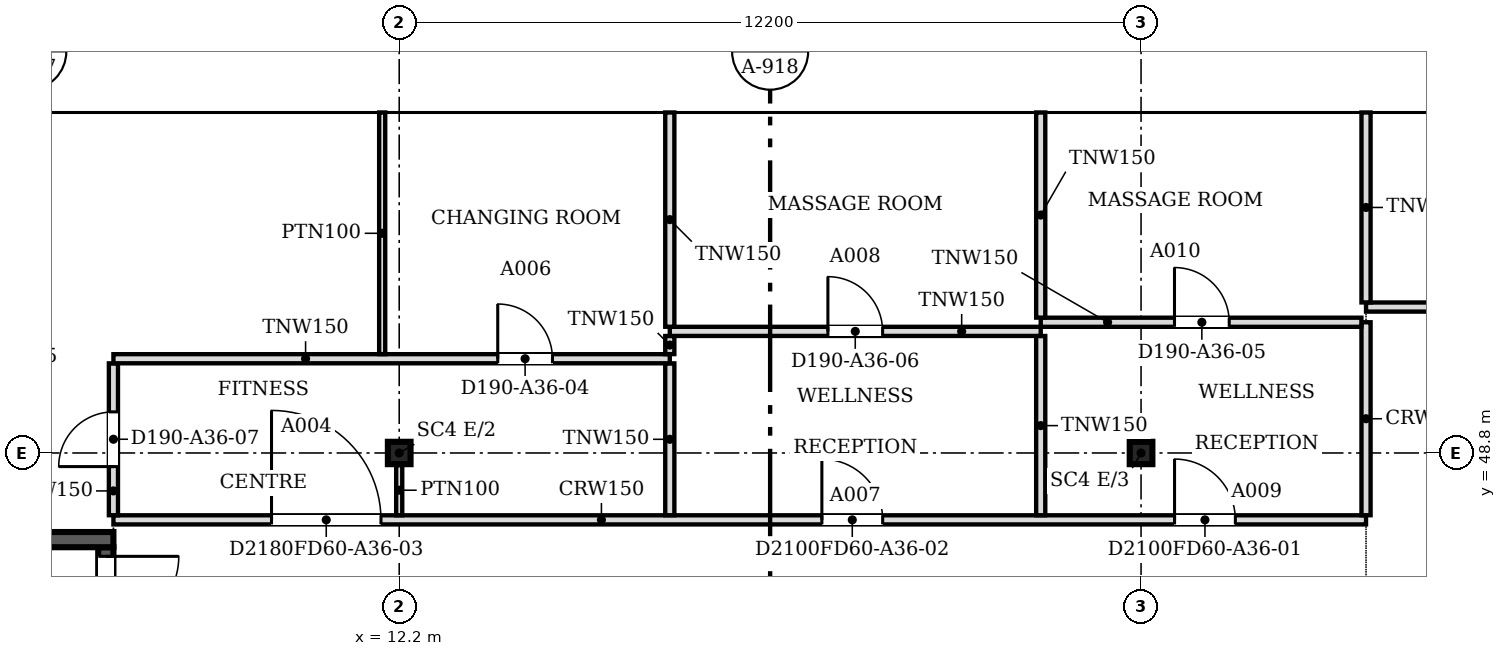
"""IFC4 building model, lengths in metres.
Left out: names, types, materials, properties, quantities, classifications, styles, units other than length and angle.
Written with IfcOpenShell. Run it as: python <this file> out.ifc"""

import sys

from ifc_helpers import new_model, si_unit, direction, frame, frame_2d, origin, origin_2d, place, context, subcontext, project, spatial, polyline, rectangle, i_section, outline, extrude, faceted_brep, source, transform, mapped, element, fill, save


model = new_model("IFC4")
c1 = context("Model", 3, precision=1e-05, world=origin(), true_north=direction((0.0, 1.0)))
c2 = subcontext(c1, "Body", "Model", "MODEL_VIEW")
j1 = project(units=[si_unit("LENGTHUNIT", "METRE"), si_unit("PLANEANGLEUNIT", "RADIAN")], contexts=[c1])
p1 = place(None, origin())
s1 = spatial("IfcSite", under=j1, at=p1, CompositionType="ELEMENT")
p2 = place(p1, origin())
s2 = spatial("IfcBuilding", under=s1, at=p2, CompositionType="ELEMENT")
p3 = place(p2, frame((0.0, 0.0, 236.9)))
s3 = spatial("IfcBuildingStorey", under=s2, at=p3, CompositionType="ELEMENT", Elevation=236.9)
for number, where, z_axis, x_axis in (
    (1, (12.2, 48.8, 0.0), (0.0, 0.0, 1.0), (1.0, 0.0, 0.0)),
    (2, (24.4, 48.8, 0.0), (0.0, 0.0, 1.0), (1.0, 0.0, 0.0)),
):
    element("IfcColumn", number, at=place(p3, frame(where, z_axis=z_axis, x_axis=x_axis)), inside=s3, PredefinedType="COLUMN", context=c2, shape_type="SweptSolid", body=[
        extrude(i_section(OverallWidth=0.373, OverallDepth=0.368, WebThickness=0.015, FlangeThickness=0.024, at=origin_2d()), origin(), (0.0, 0.0, 1.0), 3.6),
    ])
m1 = source(origin(), c2, "Body", "SweptSolid", [
    extrude(outline(polyline([(6.1, 0.0), (3.05, 3.8), (0.0, 0.0), (6.1, 0.0)])), frame((0.0, 0.25, 0.0), z_axis=(0.0, -1.0, 0.0), x_axis=(1.0, 0.0, 0.0)), (0.0, 0.0, 1.0), 0.5),
])
p4 = place(p3, frame((33.55, 54.65, 0.0), z_axis=(0.0, 0.0, 1.0), x_axis=(-1.0, 0.0, 0.0)))
e3 = element("IfcWall", 3, at=p4, inside=s3, PredefinedType="SOLIDWALL", context=c2, shape_type="MappedRepresentation", body=[
    mapped(m1, transform((0.0, 0.0, 0.0), scale=1.0)),
])
m2 = source(origin(), c2, "Body", "SweptSolid", [
    extrude(outline(polyline([(5.579, 0.25), (3.05, 3.401), (0.521, 0.25), (5.579, 0.25)])), frame((0.0, 0.26, 0.0), z_axis=(0.0, -1.0, 0.0), x_axis=(1.0, 0.0, 0.0)), (0.0, 0.0, 1.0), 0.52),
])
p5 = place(p4, origin())
e4 = element("IfcOpeningElement", 4, at=p5, cuts=e3, PredefinedType="OPENING", context=c2, shape_type="MappedRepresentation", body=[
    mapped(m2, transform((0.0, 0.0, 0.0), scale=1.0)),
])
m3 = source(origin(), c2, "Body", "Brep", [
    faceted_brep([(6.1, -0.25, 0.0), (3.05, -0.25, 3.8), (0.0, -0.25, 0.0), (6.1, -0.25, 0.0), (0.0, 0.25, 0.0), (3.05, 0.25, 3.8), (6.1, 0.25, 0.0), (6.1, 0.25, 0.0)], [[[0, 1, 2, 3]], [[4, 5, 6, 7]], [[6, 5, 1, 0]], [[5, 4, 2, 1]], [[4, 7, 3, 2]], [[3, 7, 6, 0]]]),
])
p6 = place(p3, frame((27.45, 54.65, 0.0), z_axis=(0.0, 0.0, 1.0), x_axis=(-1.0, 0.0, 0.0)))
e5 = element("IfcWall", 5, at=p6, inside=s3, PredefinedType="SOLIDWALL", context=c2, shape_type="MappedRepresentation", body=[
    mapped(m3, transform((0.0, 0.0, 0.0), scale=1.0)),
])
p7 = place(p6, origin())
e6 = element("IfcOpeningElement", 6, at=p7, cuts=e5, PredefinedType="OPENING", context=c2, shape_type="MappedRepresentation", body=[
    mapped(m2, transform((0.0, 0.0, 0.0), scale=1.0)),
])
p8 = place(p3, frame((21.35, 54.65, 0.0), z_axis=(0.0, 0.0, 1.0), x_axis=(-1.0, 0.0, 0.0)))
e7 = element("IfcWall", 7, at=p8, inside=s3, PredefinedType="SOLIDWALL", context=c2, shape_type="MappedRepresentation", body=[
    mapped(m1, transform((0.0, 0.0, 0.0), scale=1.0)),
])
p9 = place(p8, origin())
e8 = element("IfcOpeningElement", 8, at=p9, cuts=e7, PredefinedType="OPENING", context=c2, shape_type="MappedRepresentation", body=[
    mapped(m2, transform((0.0, 0.0, 0.0), scale=1.0)),
])
p10 = place(p3, frame((15.25, 54.65, 0.0), z_axis=(0.0, 0.0, 1.0), x_axis=(-1.0, 0.0, 0.0)))
e9 = element("IfcWall", 9, at=p10, inside=s3, PredefinedType="SOLIDWALL", context=c2, shape_type="MappedRepresentation", body=[
    mapped(m1, transform((0.0, 0.0, 0.0), scale=1.0)),
])
p11 = place(p10, origin())
e10 = element("IfcOpeningElement", 10, at=p11, cuts=e9, PredefinedType="OPENING", context=c2, shape_type="MappedRepresentation", body=[
    mapped(m2, transform((0.0, 0.0, 0.0), scale=1.0)),
])
m4 = source(origin(), c2, "Body", "Brep", [
    faceted_brep([(3.05, -0.25, 3.74), (3.003, -0.25, 3.8), (0.0, -0.25, 0.0), (3.05, -0.25, 0.0), (0.0, 0.25, 0.0), (2.957, 0.25, 3.741), (2.957, 0.25, 0.0), (3.003, 0.0, 3.8)], [[[0, 1, 2, 3]], [[4, 5, 6]], [[7, 1, 0]], [[5, 4, 2, 1, 7]], [[4, 6, 3, 2]], [[3, 6, 5, 7, 0]]]),
])
p12 = place(p3, frame((9.15, 54.65, 0.0), z_axis=(0.0, 0.0, 1.0), x_axis=(-1.0, 0.0, 0.0)))
e11 = element("IfcWall", 11, at=p12, inside=s3, PredefinedType="SOLIDWALL", context=c2, shape_type="MappedRepresentation", body=[
    mapped(m4, transform((0.0, 0.0, 0.0), scale=1.0)),
])
m5 = source(origin(), c2, "Body", "SweptSolid", [
    extrude(outline(polyline([(2.803, 3.144), (0.516, 0.25), (2.803, 0.25), (2.803, 3.144)])), frame((0.0, 0.26, 0.0), z_axis=(0.0, -1.0, 0.0), x_axis=(1.0, 0.0, 0.0)), (0.0, 0.0, 1.0), 0.52),
])
p13 = place(p12, origin())
e12 = element("IfcOpeningElement", 12, at=p13, cuts=e11, PredefinedType="OPENING", context=c2, shape_type="MappedRepresentation", body=[
    mapped(m5, transform((0.0, 0.0, 0.0), scale=1.0)),
])
p14 = place(p2, frame((0.0, 0.0, 240.7)))
s4 = spatial("IfcBuildingStorey", under=s2, at=p14, CompositionType="ELEMENT", Elevation=240.7)
m6 = source(origin(), c2, "Body", "SweptSolid", [
    extrude(outline(polyline([(3.05, 0.0), (6.1, 3.8), (3.05, 7.6), (0.0, 3.8), (3.05, 0.0)])), frame((0.0, 0.25, 0.0), z_axis=(0.0, -1.0, 0.0), x_axis=(1.0, 0.0, 0.0)), (0.0, 0.0, 1.0), 0.5),
])
p15 = place(p14, frame((30.5, 54.65, -3.8), z_axis=(0.0, 0.0, 1.0), x_axis=(-1.0, 0.0, 0.0)))
e13 = element("IfcWall", 13, at=p15, inside=s4, PredefinedType="SOLIDWALL", context=c2, shape_type="MappedRepresentation", body=[
    mapped(m6, transform((0.0, 0.0, 0.0), scale=1.0)),
])
m7 = source(origin(), c2, "Body", "SweptSolid", [
    extrude(outline(polyline([(3.05, 0.399), (5.78, 3.8), (3.05, 7.201), (0.321, 3.8), (3.05, 0.399)])), frame((0.0, 0.26, 0.0), z_axis=(0.0, -1.0, 0.0), x_axis=(1.0, 0.0, 0.0)), (0.0, 0.0, 1.0), 0.52),
])
p16 = place(p15, origin())
e14 = element("IfcOpeningElement", 14, at=p16, cuts=e13, PredefinedType="OPENING", context=c2, shape_type="MappedRepresentation", body=[
    mapped(m7, transform((0.0, 0.0, 0.0), scale=1.0)),
])
m8 = source(origin(), c2, "Body", "Brep", [
    faceted_brep([(3.05, -0.25, 0.0), (6.1, -0.25, 3.8), (6.1, -0.25, 3.8), (3.05, -0.25, 7.6), (0.0, -0.25, 3.8), (0.0, 0.25, 3.8), (3.05, 0.25, 7.6), (6.1, 0.25, 3.8), (6.1, 0.25, 3.8), (3.05, 0.25, 0.0)], [[[0, 1, 2, 3, 4]], [[5, 6, 7, 8, 9]], [[9, 8, 1, 0]], [[7, 6, 3, 2]], [[6, 5, 4, 3]], [[5, 9, 0, 4]], [[1, 8, 7, 2]]]),
])
p17 = place(p14, frame((24.4, 54.65, -3.8), z_axis=(0.0, 0.0, 1.0), x_axis=(-1.0, 0.0, 0.0)))
e15 = element("IfcWall", 15, at=p17, inside=s4, PredefinedType="SOLIDWALL", context=c2, shape_type="MappedRepresentation", body=[
    mapped(m8, transform((0.0, 0.0, 0.0), scale=1.0)),
])
p18 = place(p17, origin())
e16 = element("IfcOpeningElement", 16, at=p18, cuts=e15, PredefinedType="OPENING", context=c2, shape_type="MappedRepresentation", body=[
    mapped(m7, transform((0.0, 0.0, 0.0), scale=1.0)),
])
p19 = place(p14, frame((18.3, 54.65, -3.8), z_axis=(0.0, 0.0, 1.0), x_axis=(-1.0, 0.0, 0.0)))
e17 = element("IfcWall", 17, at=p19, inside=s4, PredefinedType="SOLIDWALL", context=c2, shape_type="MappedRepresentation", body=[
    mapped(m6, transform((0.0, 0.0, 0.0), scale=1.0)),
])
p20 = place(p19, origin())
e18 = element("IfcOpeningElement", 18, at=p20, cuts=e17, PredefinedType="OPENING", context=c2, shape_type="MappedRepresentation", body=[
    mapped(m7, transform((0.0, 0.0, 0.0), scale=1.0)),
])
m9 = source(origin(), c2, "Body", "Brep", [
    faceted_brep([(3.05, -0.25, 0.0), (6.053, -0.25, 3.8), (3.05, -0.25, 7.6), (0.0, -0.25, 3.8), (0.0, 0.25, 3.8), (3.05, 0.25, 7.6), (6.007, 0.25, 3.859), (6.007, 0.25, 3.741), (3.05, 0.25, 0.0), (6.053, 0.0, 3.8)], [[[0, 1, 2, 3]], [[4, 5, 6, 7, 8]], [[8, 7, 9, 1, 0]], [[6, 5, 2, 1, 9]], [[5, 4, 3, 2]], [[4, 8, 0, 3]], [[9, 7, 6]]]),
])
p21 = place(p14, frame((12.2, 54.65, -3.8), z_axis=(0.0, 0.0, 1.0), x_axis=(-1.0, 0.0, 0.0)))
e19 = element("IfcWall", 19, at=p21, inside=s4, PredefinedType="SOLIDWALL", context=c2, shape_type="MappedRepresentation", body=[
    mapped(m9, transform((0.0, 0.0, 0.0), scale=1.0)),
])
m10 = source(origin(), c2, "Body", "SweptSolid", [
    extrude(outline(polyline([(3.049, 0.401), (5.735, 3.8), (3.049, 7.199), (0.321, 3.8), (3.049, 0.401)])), frame((0.0, 0.26, 0.0), z_axis=(0.0, -1.0, 0.0), x_axis=(1.0, 0.0, 0.0)), (0.0, 0.0, 1.0), 0.52),
])
p22 = place(p21, origin())
e20 = element("IfcOpeningElement", 20, at=p22, cuts=e19, PredefinedType="OPENING", context=c2, shape_type="MappedRepresentation", body=[
    mapped(m10, transform((0.0, 0.0, 0.0), scale=1.0)),
])
p23 = place(p3, frame((3.6, 47.375, 0.0), z_axis=(0.0, 0.0, 1.0), x_axis=(1.0, 0.0, 0.0)))
e21 = element("IfcWall", 21, at=p23, inside=s3, PredefinedType="SOLIDWALL", context=c2, shape_type="SweptSolid", body=[
    extrude(rectangle(XDim=3.9, YDim=0.25, at=frame_2d((1.95, 0.0))), origin(), (0.0, 0.0, 1.0), 3.8),
])
p24 = place(p3, frame((7.375, 47.25, 0.0), z_axis=(0.0, 0.0, 1.0), x_axis=(0.0, -1.0, 0.0)))
e22 = element("IfcWall", 22, at=p24, inside=s3, PredefinedType="SOLIDWALL", context=c2, shape_type="SweptSolid", body=[
    extrude(rectangle(XDim=8.0, YDim=0.25, at=frame_2d((4.0, 0.0))), origin(), (0.0, 0.0, 1.0), 3.8),
])
m11 = source(origin(), c2, "Body", "SweptSolid", [
    extrude(rectangle(XDim=1.2, YDim=2.1, at=frame_2d((0.6, 1.05))), frame((0.0, 0.135, 0.0), z_axis=(0.0, -1.0, 0.0), x_axis=(1.0, 0.0, 0.0)), (0.0, 0.0, 1.0), 0.27),
])
p25 = place(p24, frame((0.15, 0.0, 0.0)))
e23 = element("IfcOpeningElement", 23, at=p25, cuts=e22, PredefinedType="OPENING", context=c2, shape_type="MappedRepresentation", body=[
    mapped(m11, transform((0.0, 0.0, 0.0), scale=1.0)),
])
p26 = place(p3, frame((7.5, 47.7, 0.0), z_axis=(0.0, 0.0, 1.0), x_axis=(1.0, 0.0, 0.0)))
e24 = element("IfcWall", 24, at=p26, inside=s3, PredefinedType="PARTITIONING", context=c2, shape_type="SweptSolid", body=[
    extrude(rectangle(XDim=20.6, YDim=0.15, at=frame_2d((10.3, 0.0))), origin(), (0.0, 0.0, 1.0), 3.067),
])
m12 = source(origin(), c2, "Body", "SweptSolid", [
    extrude(rectangle(XDim=1.0, YDim=2.1, at=frame_2d((0.5, 1.05))), frame((0.0, 0.085, 0.0), z_axis=(0.0, -1.0, 0.0), x_axis=(1.0, 0.0, 0.0)), (0.0, 0.0, 1.0), 0.17),
])
p27 = place(p26, frame((17.451, 0.0, 0.0)))
e25 = element("IfcOpeningElement", 25, at=p27, cuts=e24, PredefinedType="OPENING", context=c2, shape_type="MappedRepresentation", body=[
    mapped(m12, transform((0.0, 0.0, 0.0), scale=1.0)),
])
p28 = place(p26, frame((11.651, 0.0, 0.0)))
e26 = element("IfcOpeningElement", 26, at=p28, cuts=e24, PredefinedType="OPENING", context=c2, shape_type="MappedRepresentation", body=[
    mapped(m12, transform((0.0, 0.0, 0.0), scale=1.0)),
])
m13 = source(origin(), c2, "Body", "SweptSolid", [
    extrude(rectangle(XDim=1.8, YDim=2.1, at=frame_2d((0.9, 1.05))), frame((0.0, 0.085, 0.0), z_axis=(0.0, -1.0, 0.0), x_axis=(1.0, 0.0, 0.0)), (0.0, 0.0, 1.0), 0.17),
])
p29 = place(p26, frame((2.6, 0.0, 0.0)))
e27 = element("IfcOpeningElement", 27, at=p29, cuts=e24, PredefinedType="OPENING", context=c2, shape_type="MappedRepresentation", body=[
    mapped(m13, transform((0.0, 0.0, 0.0), scale=1.0)),
])
p30 = place(p3, frame((7.5, 47.776, 0.0), z_axis=(0.0, 0.0, 1.0), x_axis=(0.0, 1.0, 0.0)))
e28 = element("IfcWall", 28, at=p30, inside=s3, PredefinedType="PARTITIONING", context=c2, shape_type="SweptSolid", body=[
    extrude(rectangle(XDim=2.498, YDim=0.15, at=frame_2d((1.249, 0.0))), origin(), (0.0, 0.0, 1.0), 3.067),
])
m14 = source(origin(), c2, "Body", "SweptSolid", [
    extrude(rectangle(XDim=0.9, YDim=2.1, at=frame_2d((0.45, 1.05))), frame((0.0, 0.085, 0.0), z_axis=(0.0, -1.0, 0.0), x_axis=(1.0, 0.0, 0.0)), (0.0, 0.0, 1.0), 0.17),
])
p31 = place(p30, frame((0.8, 0.0, 0.0)))
e29 = element("IfcOpeningElement", 29, at=p31, cuts=e28, PredefinedType="OPENING", context=c2, shape_type="MappedRepresentation", body=[
    mapped(m14, transform((0.0, 0.0, 0.0), scale=1.0)),
])
p32 = place(p3, frame((16.65, 47.776, 0.0), z_axis=(0.0, 0.0, 1.0), x_axis=(0.0, 1.0, 0.0)))
e30 = element("IfcWall", 30, at=p32, inside=s3, PredefinedType="PARTITIONING", context=c2, shape_type="SweptSolid", body=[
    extrude(rectangle(XDim=2.498, YDim=0.15, at=frame_2d((1.249, 0.0))), origin(), (0.0, 0.0, 1.0), 3.067),
])
p33 = place(p3, frame((22.75, 47.776, 0.0), z_axis=(0.0, 0.0, 1.0), x_axis=(0.0, 1.0, 0.0)))
e31 = element("IfcWall", 31, at=p33, inside=s3, PredefinedType="PARTITIONING", context=c2, shape_type="SweptSolid", body=[
    extrude(rectangle(XDim=2.948, YDim=0.15, at=frame_2d((1.474, 0.0))), origin(), (0.0, 0.0, 1.0), 3.067),
])
p34 = place(p3, frame((28.1, 47.776, 0.0), z_axis=(0.0, 0.0, 1.0), x_axis=(0.0, 1.0, 0.0)))
e32 = element("IfcWall", 32, at=p34, inside=s3, PredefinedType="PARTITIONING", context=c2, shape_type="SweptSolid", body=[
    extrude(rectangle(XDim=3.174, YDim=0.15, at=frame_2d((1.587, 0.0))), origin(), (0.0, 0.0, 1.0), 3.067),
])
p35 = place(p3, frame((12.2, 48.6, 0.0), z_axis=(0.0, 0.0, 1.0), x_axis=(0.0, -1.0, 0.0)))
e33 = element("IfcWall", 33, at=p35, inside=s3, PredefinedType="PARTITIONING", context=c2, shape_type="SweptSolid", body=[
    extrude(rectangle(XDim=0.825, YDim=0.1, at=frame_2d((0.413, 0.0))), origin(), (0.0, 0.0, 1.0), 3.067),
])
p36 = place(p3, frame((7.5, 50.35, 0.0), z_axis=(0.0, 0.0, 1.0), x_axis=(1.0, 0.0, 0.0)))
e34 = element("IfcWall", 34, at=p36, inside=s3, PredefinedType="PARTITIONING", context=c2, shape_type="SweptSolid", body=[
    extrude(rectangle(XDim=9.15, YDim=0.15, at=frame_2d((4.575, 0.0))), origin(), (0.0, 0.0, 1.0), 3.067),
])
p37 = place(p36, frame((6.32, 0.0, 0.0)))
e35 = element("IfcOpeningElement", 35, at=p37, cuts=e34, PredefinedType="OPENING", context=c2, shape_type="MappedRepresentation", body=[
    mapped(m14, transform((0.0, 0.0, 0.0), scale=1.0)),
])
p38 = place(p3, frame((11.92, 50.426, 0.0), z_axis=(0.0, 0.0, 1.0), x_axis=(0.0, 1.0, 0.0)))
e36 = element("IfcWall", 36, at=p38, inside=s3, PredefinedType="PARTITIONING", context=c2, shape_type="SweptSolid", body=[
    extrude(rectangle(XDim=3.974, YDim=0.1, at=frame_2d((1.987, 0.0))), origin(), (0.0, 0.0, 1.0), 3.067),
])
p39 = place(p3, frame((16.65, 50.426, 0.0), z_axis=(0.0, 0.0, 1.0), x_axis=(0.0, 1.0, 0.0)))
e37 = element("IfcWall", 37, at=p39, inside=s3, PredefinedType="PARTITIONING", context=c2, shape_type="SweptSolid", body=[
    extrude(rectangle(XDim=0.298, YDim=0.15, at=frame_2d((0.149, 0.0))), origin(), (0.0, 0.0, 1.0), 3.067),
])
p40 = place(p3, frame((16.65, 50.8, 0.0), z_axis=(0.0, 0.0, 1.0), x_axis=(1.0, 0.0, 0.0)))
e38 = element("IfcWall", 38, at=p40, inside=s3, PredefinedType="PARTITIONING", context=c2, shape_type="SweptSolid", body=[
    extrude(rectangle(XDim=6.1, YDim=0.15, at=frame_2d((3.05, 0.0))), origin(), (0.0, 0.0, 1.0), 3.067),
])
p41 = place(p40, frame((2.6, 0.0, 0.0)))
e39 = element("IfcOpeningElement", 39, at=p41, cuts=e38, PredefinedType="OPENING", context=c2, shape_type="MappedRepresentation", body=[
    mapped(m14, transform((0.0, 0.0, 0.0), scale=1.0)),
])
p42 = place(p3, frame((16.65, 50.876, 0.0), z_axis=(0.0, 0.0, 1.0), x_axis=(0.0, 1.0, 0.0)))
e40 = element("IfcWall", 40, at=p42, inside=s3, PredefinedType="PARTITIONING", context=c2, shape_type="SweptSolid", body=[
    extrude(rectangle(XDim=3.524, YDim=0.15, at=frame_2d((1.762, 0.0))), origin(), (0.0, 0.0, 1.0), 3.067),
])
p43 = place(p3, frame((22.75, 50.95, 0.0), z_axis=(0.0, 0.0, 1.0), x_axis=(1.0, 0.0, 0.0)))
e41 = element("IfcWall", 41, at=p43, inside=s3, PredefinedType="PARTITIONING", context=c2, shape_type="SweptSolid", body=[
    extrude(rectangle(XDim=5.274, YDim=0.15, at=frame_2d((2.637, 0.0))), origin(), (0.0, 0.0, 1.0), 3.067),
])
p44 = place(p43, frame((2.2, 0.0, 0.0)))
e42 = element("IfcOpeningElement", 42, at=p44, cuts=e41, PredefinedType="OPENING", context=c2, shape_type="MappedRepresentation", body=[
    mapped(m14, transform((0.0, 0.0, 0.0), scale=1.0)),
])
p45 = place(p3, frame((22.75, 51.026, 0.0), z_axis=(0.0, 0.0, 1.0), x_axis=(0.0, 1.0, 0.0)))
e43 = element("IfcWall", 43, at=p45, inside=s3, PredefinedType="PARTITIONING", context=c2, shape_type="SweptSolid", body=[
    extrude(rectangle(XDim=3.374, YDim=0.15, at=frame_2d((1.687, 0.0))), origin(), (0.0, 0.0, 1.0), 3.067),
])
p46 = place(p3, frame((28.1, 51.2, 0.0), z_axis=(0.0, 0.0, 1.0), x_axis=(1.0, 0.0, 0.0)))
e44 = element("IfcWall", 44, at=p46, inside=s3, PredefinedType="PARTITIONING", context=c2, shape_type="SweptSolid", body=[
    extrude(rectangle(XDim=31.438, YDim=0.15, at=frame_2d((15.719, 0.0))), origin(), (0.0, 0.0, 1.0), 3.067),
])
p47 = place(p46, frame((16.301, 0.0, 0.0)))
e45 = element("IfcOpeningElement", 45, at=p47, cuts=e44, PredefinedType="OPENING", context=c2, shape_type="MappedRepresentation", body=[
    mapped(m14, transform((0.0, 0.0, 0.0), scale=1.0)),
])
p48 = place(p46, frame((25.95, 0.0, 0.0)))
e46 = element("IfcOpeningElement", 46, at=p48, cuts=e44, PredefinedType="OPENING", context=c2, shape_type="MappedRepresentation", body=[
    mapped(m14, transform((0.0, 0.0, 0.0), scale=1.0)),
])
p49 = place(p46, frame((5.6, 0.0, 0.0)))
e47 = element("IfcOpeningElement", 47, at=p49, cuts=e44, PredefinedType="OPENING", context=c2, shape_type="MappedRepresentation", body=[
    mapped(m14, transform((0.0, 0.0, 0.0), scale=1.0)),
])
p50 = place(p3, frame((28.1, 51.276, 0.0), z_axis=(0.0, 0.0, 1.0), x_axis=(0.0, 1.0, 0.0)))
e48 = element("IfcWall", 48, at=p50, inside=s3, PredefinedType="PARTITIONING", context=c2, shape_type="SweptSolid", body=[
    extrude(rectangle(XDim=3.124, YDim=0.15, at=frame_2d((1.562, 0.0))), origin(), (0.0, 0.0, 1.0), 3.067),
])
m15 = source(origin(), c2, "Body", "SweptSolid", [
    extrude(rectangle(XDim=1.2, YDim=2.1, at=frame_2d((0.6, 1.05))), frame((0.0, 0.025, 0.0), z_axis=(0.0, -1.0, 0.0), x_axis=(1.0, 0.0, 0.0)), (0.0, 0.0, 1.0), 0.05),
])
p51 = place(p25, origin())
e49 = element("IfcDoor", 49, at=p51, inside=s3, OperationType="SINGLE_SWING_LEFT", PredefinedType="DOOR", context=c2, shape_type="MappedRepresentation", body=[
    mapped(m15, transform((0.0, 0.0, 0.0), scale=1.0)),
])
fill(e23, e49)
m16 = source(origin(), c2, "Body", "SweptSolid", [
    extrude(rectangle(XDim=0.9, YDim=2.1, at=frame_2d((0.45, 1.05))), frame((0.0, 0.025, 0.0), z_axis=(0.0, -1.0, 0.0), x_axis=(1.0, 0.0, 0.0)), (0.0, 0.0, 1.0), 0.05),
])
p52 = place(p37, origin())
e50 = element("IfcDoor", 50, at=p52, inside=s3, OperationType="SINGLE_SWING_LEFT", PredefinedType="DOOR", context=c2, shape_type="MappedRepresentation", body=[
    mapped(m16, transform((0.0, 0.0, 0.0), scale=1.0)),
])
fill(e35, e50)
p53 = place(p44, origin())
e51 = element("IfcDoor", 51, at=p53, inside=s3, OperationType="SINGLE_SWING_LEFT", PredefinedType="DOOR", context=c2, shape_type="MappedRepresentation", body=[
    mapped(m16, transform((0.0, 0.0, 0.0), scale=1.0)),
])
fill(e42, e51)
m17 = source(origin(), c2, "Body", "SweptSolid", [
    extrude(rectangle(XDim=1.0, YDim=2.1, at=frame_2d((0.5, 1.05))), frame((0.0, 0.025, 0.0), z_axis=(0.0, -1.0, 0.0), x_axis=(1.0, 0.0, 0.0)), (0.0, 0.0, 1.0), 0.05),
])
p54 = place(p27, origin())
e52 = element("IfcDoor", 52, at=p54, inside=s3, OperationType="SINGLE_SWING_LEFT", PredefinedType="DOOR", context=c2, shape_type="MappedRepresentation", body=[
    mapped(m17, transform((0.0, 0.0, 0.0), scale=1.0)),
])
fill(e25, e52)
p55 = place(p28, origin())
e53 = element("IfcDoor", 53, at=p55, inside=s3, OperationType="SINGLE_SWING_LEFT", PredefinedType="DOOR", context=c2, shape_type="MappedRepresentation", body=[
    mapped(m17, transform((0.0, 0.0, 0.0), scale=1.0)),
])
fill(e26, e53)
p56 = place(p41, origin())
e54 = element("IfcDoor", 54, at=p56, inside=s3, OperationType="SINGLE_SWING_LEFT", PredefinedType="DOOR", context=c2, shape_type="MappedRepresentation", body=[
    mapped(m16, transform((0.0, 0.0, 0.0), scale=1.0)),
])
fill(e39, e54)
p57 = place(p31, origin())
e55 = element("IfcDoor", 55, at=p57, inside=s3, OperationType="SINGLE_SWING_LEFT", PredefinedType="DOOR", context=c2, shape_type="MappedRepresentation", body=[
    mapped(m16, transform((0.0, 0.0, 0.0), scale=1.0)),
])
fill(e29, e55)
m18 = source(origin(), c2, "Body", "SweptSolid", [
    extrude(rectangle(XDim=1.8, YDim=2.1, at=frame_2d((0.9, 1.05))), frame((0.0, 0.025, 0.0), z_axis=(0.0, -1.0, 0.0), x_axis=(1.0, 0.0, 0.0)), (0.0, 0.0, 1.0), 0.05),
])
p58 = place(p29, origin())
e56 = element("IfcDoor", 56, at=p58, inside=s3, OperationType="DOUBLE_DOOR_SINGLE_SWING", PredefinedType="DOOR", context=c2, shape_type="MappedRepresentation", body=[
    mapped(m18, transform((0.0, 0.0, 0.0), scale=1.0)),
])
fill(e27, e56)
save(model, sys.argv[1])
